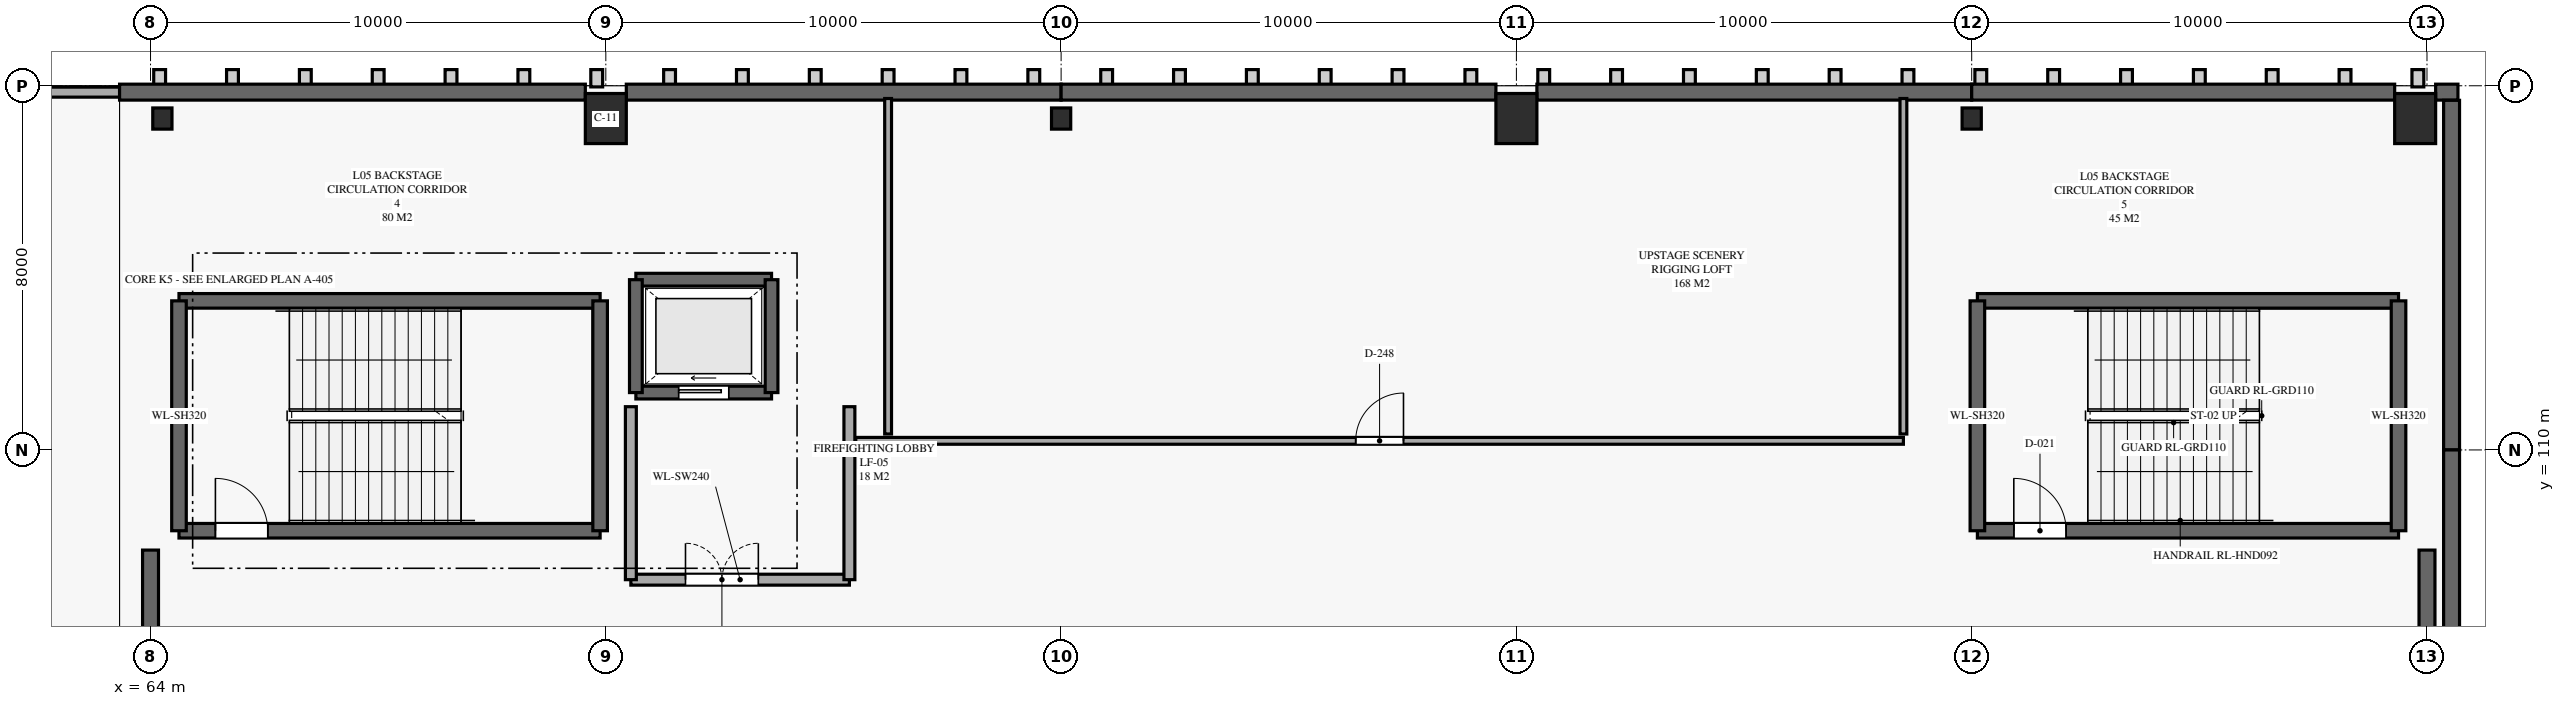
"""IFC4 building model, lengths in metres.
Left out: names, types, materials, properties, quantities, classifications, styles, units other than length and angle.
Written with IfcOpenShell. Run it as: python <this file> out.ifc"""

import sys

from ifc_helpers import new_model, si_unit, direction, frame, frame_2d, origin, origin_2d, place, context, subcontext, project, spatial, rectangle, i_section, extrude, element, fill, save


model = new_model("IFC4")
c1 = context("Model", 3, precision=1e-05, world=origin(), true_north=direction((0.0, 1.0)))
c2 = subcontext(c1, "Body", "Model", "MODEL_VIEW")
j1 = project(units=[si_unit("LENGTHUNIT", "METRE"), si_unit("PLANEANGLEUNIT", "RADIAN")], contexts=[c1])
p1 = place(None, origin())
s1 = spatial("IfcSite", under=j1, at=p1, CompositionType="ELEMENT")
p2 = place(p1, origin())
s2 = spatial("IfcBuilding", under=s1, at=p2, CompositionType="ELEMENT")
p3 = place(p2, frame((0.0, 0.0, 24.8)))
s3 = spatial("IfcBuildingStorey", under=s2, at=p3, CompositionType="ELEMENT", Elevation=24.8)
p4 = place(p3, frame((64.26, 117.28, 0.0), z_axis=(0.0, 0.0, 1.0), x_axis=(1.0, 0.0, 0.0)))
e1 = element("IfcColumn", 1, at=p4, inside=s3, PredefinedType="COLUMN", context=c2, shape_type="SweptSolid", body=[
    extrude(i_section(OverallWidth=0.422, OverallDepth=0.465, WebThickness=0.045, FlangeThickness=0.073, FilletRadius=0.02, at=origin_2d()), origin(), (0.0, 0.0, 1.0), 4.8),
])
p5 = place(p3, frame((74.0, 117.28, 0.0), z_axis=(0.0, 0.0, 1.0), x_axis=(1.0, 0.0, 0.0)))
e2 = element("IfcColumn", 2, at=p5, inside=s3, PredefinedType="COLUMN", context=c2, shape_type="SweptSolid", body=[
    extrude(rectangle(XDim=0.9, YDim=1.1, at=origin_2d()), origin(), (0.0, 0.0, 1.0), 4.8),
])
p6 = place(p3, frame((84.0, 117.28, 0.0), z_axis=(0.0, 0.0, 1.0), x_axis=(1.0, 0.0, 0.0)))
e3 = element("IfcColumn", 3, at=p6, inside=s3, PredefinedType="COLUMN", context=c2, shape_type="SweptSolid", body=[
    extrude(i_section(OverallWidth=0.422, OverallDepth=0.465, WebThickness=0.045, FlangeThickness=0.073, FilletRadius=0.02, at=origin_2d()), origin(), (0.0, 0.0, 1.0), 4.8),
])
p7 = place(p3, frame((94.0, 117.28, 0.0), z_axis=(0.0, 0.0, 1.0), x_axis=(1.0, 0.0, 0.0)))
e4 = element("IfcColumn", 4, at=p7, inside=s3, PredefinedType="COLUMN", context=c2, shape_type="SweptSolid", body=[
    extrude(rectangle(XDim=0.9, YDim=1.1, at=origin_2d()), origin(), (0.0, 0.0, 1.0), 4.8),
])
p8 = place(p3, frame((104.0, 117.28, 0.0), z_axis=(0.0, 0.0, 1.0), x_axis=(1.0, 0.0, 0.0)))
e5 = element("IfcColumn", 5, at=p8, inside=s3, PredefinedType="COLUMN", context=c2, shape_type="SweptSolid", body=[
    extrude(i_section(OverallWidth=0.422, OverallDepth=0.465, WebThickness=0.045, FlangeThickness=0.073, FilletRadius=0.02, at=origin_2d()), origin(), (0.0, 0.0, 1.0), 4.8),
])
p9 = place(p3, frame((113.74, 117.28, 0.0), z_axis=(0.0, 0.0, 1.0), x_axis=(1.0, 0.0, 0.0)))
e6 = element("IfcColumn", 6, at=p9, inside=s3, PredefinedType="COLUMN", context=c2, shape_type="SweptSolid", body=[
    extrude(rectangle(XDim=0.9, YDim=1.1, at=origin_2d()), origin(), (0.0, 0.0, 1.0), 4.8),
])
p10 = place(p3, frame((64.625, 108.225, 0.0), z_axis=(0.0, 0.0, 1.0), x_axis=(1.0, 0.0, 0.0)))
e7 = element("IfcWall", 7, at=p10, inside=s3, PredefinedType="SHEAR", context=c2, shape_type="SweptSolid", body=[
    extrude(rectangle(XDim=9.25, YDim=0.32, at=frame_2d((4.625, 0.0))), origin(), (0.0, 0.0, 1.0), 4.56),
])
p11 = place(p10, frame((0.8, 0.0, 0.0)))
e8 = element("IfcOpeningElement", 8, at=p11, cuts=e7, PredefinedType="OPENING", context=c2, shape_type="SweptSolid", body=[
    extrude(rectangle(XDim=1.15, YDim=2.2, at=frame_2d((0.575, 1.1))), frame((0.0, 0.17, 0.0), z_axis=(0.0, -1.0, 0.0), x_axis=(1.0, 0.0, 0.0)), (0.0, 0.0, 1.0), 0.34),
])
p12 = place(p3, frame((73.875, 113.275, 0.0), z_axis=(0.0, 0.0, 1.0), x_axis=(-1.0, 0.0, 0.0)))
e9 = element("IfcWall", 9, at=p12, inside=s3, PredefinedType="SHEAR", context=c2, shape_type="SweptSolid", body=[
    extrude(rectangle(XDim=9.25, YDim=0.32, at=frame_2d((4.625, 0.0))), origin(), (0.0, 0.0, 1.0), 4.56),
])
for number, where, z_axis, x_axis in (
    (10, (64.625, 113.275, 0.0), (0.0, 0.0, 1.0), (0.0, -1.0, 0.0)),
    (11, (73.875, 108.225, 0.0), (0.0, 0.0, 1.0), (0.0, 1.0, 0.0)),
):
    element("IfcWall", number, at=place(p3, frame(where, z_axis=z_axis, x_axis=x_axis)), inside=s3, PredefinedType="SHEAR", context=c2, shape_type="SweptSolid", body=[
        extrude(rectangle(XDim=5.05, YDim=0.32, at=frame_2d((2.525, 0.0))), origin(), (0.0, 0.0, 1.0), 4.56),
    ])
p13 = place(p3, frame((104.125, 108.225, 0.0), z_axis=(0.0, 0.0, 1.0), x_axis=(1.0, 0.0, 0.0)))
e12 = element("IfcWall", 12, at=p13, inside=s3, PredefinedType="SHEAR", context=c2, shape_type="SweptSolid", body=[
    extrude(rectangle(XDim=9.25, YDim=0.32, at=frame_2d((4.625, 0.0))), origin(), (0.0, 0.0, 1.0), 4.56),
])
p14 = place(p13, frame((0.8, 0.0, 0.0)))
e13 = element("IfcOpeningElement", 13, at=p14, cuts=e12, PredefinedType="OPENING", context=c2, shape_type="SweptSolid", body=[
    extrude(rectangle(XDim=1.15, YDim=2.2, at=frame_2d((0.575, 1.1))), frame((0.0, 0.17, 0.0), z_axis=(0.0, -1.0, 0.0), x_axis=(1.0, 0.0, 0.0)), (0.0, 0.0, 1.0), 0.34),
])
p15 = place(p3, frame((113.375, 113.275, 0.0), z_axis=(0.0, 0.0, 1.0), x_axis=(-1.0, 0.0, 0.0)))
e14 = element("IfcWall", 14, at=p15, inside=s3, PredefinedType="SHEAR", context=c2, shape_type="SweptSolid", body=[
    extrude(rectangle(XDim=9.25, YDim=0.32, at=frame_2d((4.625, 0.0))), origin(), (0.0, 0.0, 1.0), 4.56),
])
for number, where, z_axis, x_axis in (
    (15, (104.125, 113.275, 0.0), (0.0, 0.0, 1.0), (0.0, -1.0, 0.0)),
    (16, (113.375, 108.225, 0.0), (0.0, 0.0, 1.0), (0.0, 1.0, 0.0)),
):
    element("IfcWall", number, at=place(p3, frame(where, z_axis=z_axis, x_axis=x_axis)), inside=s3, PredefinedType="SHEAR", context=c2, shape_type="SweptSolid", body=[
        extrude(rectangle(XDim=5.05, YDim=0.32, at=frame_2d((2.525, 0.0))), origin(), (0.0, 0.0, 1.0), 4.56),
    ])
p16 = place(p3, frame((74.66, 111.26, 0.0), z_axis=(0.0, 0.0, 1.0), x_axis=(1.0, 0.0, 0.0)))
e17 = element("IfcWall", 17, at=p16, inside=s3, PredefinedType="SHEAR", context=c2, shape_type="SweptSolid", body=[
    extrude(rectangle(XDim=2.98, YDim=0.28, at=frame_2d((1.49, 0.0))), origin(), (0.0, 0.0, 1.0), 4.56),
])
p17 = place(p16, frame((0.94, 0.0, 0.0)))
e18 = element("IfcOpeningElement", 18, at=p17, cuts=e17, PredefinedType="OPENING", context=c2, shape_type="SweptSolid", body=[
    extrude(rectangle(XDim=1.1, YDim=2.2, at=frame_2d((0.55, 1.1))), frame((0.0, 0.15, 0.0), z_axis=(0.0, -1.0, 0.0), x_axis=(1.0, 0.0, 0.0)), (0.0, 0.0, 1.0), 0.3),
])
p18 = place(p3, frame((77.64, 113.74, 0.0), z_axis=(0.0, 0.0, 1.0), x_axis=(-1.0, 0.0, 0.0)))
e19 = element("IfcWall", 19, at=p18, inside=s3, PredefinedType="SHEAR", context=c2, shape_type="SweptSolid", body=[
    extrude(rectangle(XDim=2.98, YDim=0.28, at=frame_2d((1.49, 0.0))), origin(), (0.0, 0.0, 1.0), 4.56),
])
for number, where, z_axis, x_axis in (
    (20, (74.66, 113.74, 0.0), (0.0, 0.0, 1.0), (0.0, -1.0, 0.0)),
    (21, (77.64, 111.26, 0.0), (0.0, 0.0, 1.0), (0.0, 1.0, 0.0)),
):
    element("IfcWall", number, at=place(p3, frame(where, z_axis=z_axis, x_axis=x_axis)), inside=s3, PredefinedType="SHEAR", context=c2, shape_type="SweptSolid", body=[
        extrude(rectangle(XDim=2.48, YDim=0.28, at=frame_2d((1.24, 0.0))), origin(), (0.0, 0.0, 1.0), 4.56),
    ])
p19 = place(p3, frame((74.55, 107.15, 0.0), z_axis=(0.0, 0.0, 1.0), x_axis=(1.0, 0.0, 0.0)))
e22 = element("IfcWall", 22, at=p19, inside=s3, PredefinedType="SOLIDWALL", context=c2, shape_type="SweptSolid", body=[
    extrude(rectangle(XDim=4.8, YDim=0.24, at=frame_2d((2.4, 0.0))), origin(), (0.0, 0.0, 1.0), 3.432),
])
p20 = place(p19, frame((1.2, 0.0, 0.0)))
e23 = element("IfcOpeningElement", 23, at=p20, cuts=e22, PredefinedType="OPENING", context=c2, shape_type="SweptSolid", body=[
    extrude(rectangle(XDim=1.6, YDim=2.2, at=frame_2d((0.8, 1.1))), frame((0.0, 0.13, 0.0), z_axis=(0.0, -1.0, 0.0), x_axis=(1.0, 0.0, 0.0)), (0.0, 0.0, 1.0), 0.26),
])
for number, where, z_axis, x_axis in (
    (24, (74.55, 110.95, 0.0), (0.0, 0.0, 1.0), (0.0, -1.0, 0.0)),
    (25, (79.35, 107.15, 0.0), (0.0, 0.0, 1.0), (0.0, 1.0, 0.0)),
):
    element("IfcWall", number, at=place(p3, frame(where, z_axis=z_axis, x_axis=x_axis)), inside=s3, PredefinedType="SOLIDWALL", context=c2, shape_type="SweptSolid", body=[
        extrude(rectangle(XDim=3.8, YDim=0.24, at=frame_2d((1.9, 0.0))), origin(), (0.0, 0.0, 1.0), 4.56),
    ])
p21 = place(p3, frame((64.0, 102.232, 0.0), z_axis=(0.0, 0.0, 1.0), x_axis=(0.0, 1.0, 0.0)))
e26 = element("IfcWall", 26, at=p21, inside=s3, PredefinedType="SHEAR", context=c2, shape_type="SweptSolid", body=[
    extrude(rectangle(XDim=5.568, YDim=0.35, at=frame_2d((2.784, 0.0))), origin(), (0.0, 0.0, 1.0), 4.56),
])
p22 = place(p3, frame((114.0, 102.55, 0.0), z_axis=(0.0, 0.0, 1.0), x_axis=(0.0, 1.0, 0.0)))
e27 = element("IfcWall", 27, at=p22, inside=s3, PredefinedType="SHEAR", context=c2, shape_type="SweptSolid", body=[
    extrude(rectangle(XDim=5.25, YDim=0.35, at=frame_2d((2.625, 0.0))), origin(), (0.0, 0.0, 1.0), 4.56),
])
p23 = place(p3, frame((54.0, 117.86, 0.0), z_axis=(0.0, 0.0, 1.0), x_axis=(1.0, 0.0, 0.0)))
e28 = element("IfcWall", 28, at=p23, inside=s3, PredefinedType="SOLIDWALL", context=c2, shape_type="SweptSolid", body=[
    extrude(rectangle(XDim=9.32, YDim=0.22, at=frame_2d((4.66, 0.0))), origin(), (0.0, 0.0, 1.0), 4.53),
])
p24 = place(p23, frame((1.71, 0.0, 0.65)))
e29 = element("IfcOpeningElement", 29, at=p24, cuts=e28, PredefinedType="OPENING", context=c2, shape_type="SweptSolid", body=[
    extrude(rectangle(XDim=1.8, YDim=2.3, at=frame_2d((0.9, 1.15))), frame((0.0, 0.12, 0.0), z_axis=(0.0, -1.0, 0.0), x_axis=(1.0, 0.0, 0.0)), (0.0, 0.0, 1.0), 0.24),
])
p25 = place(p23, frame((4.91, 0.0, 0.65)))
e30 = element("IfcOpeningElement", 30, at=p25, cuts=e28, PredefinedType="OPENING", context=c2, shape_type="SweptSolid", body=[
    extrude(rectangle(XDim=1.6, YDim=2.3, at=frame_2d((0.8, 1.15))), frame((0.0, 0.12, 0.0), z_axis=(0.0, -1.0, 0.0), x_axis=(1.0, 0.0, 0.0)), (0.0, 0.0, 1.0), 0.24),
])
p26 = place(p3, frame((63.32, 117.86, 0.0), z_axis=(0.0, 0.0, 1.0), x_axis=(1.0, 0.0, 0.0)))
e31 = element("IfcWall", 31, at=p26, inside=s3, PredefinedType="SHEAR", context=c2, shape_type="SweptSolid", body=[
    extrude(rectangle(XDim=10.23, YDim=0.35, at=frame_2d((5.115, 0.0))), origin(), (0.0, 0.0, 1.0), 4.56),
])
for number, where, z_axis, x_axis in (
    (32, (74.45, 117.86, 0.0), (0.0, 0.0, 1.0), (1.0, 0.0, 0.0)),
    (33, (84.0, 117.86, 0.0), (0.0, 0.0, 1.0), (1.0, 0.0, 0.0)),
    (34, (94.45, 117.86, 0.0), (0.0, 0.0, 1.0), (1.0, 0.0, 0.0)),
):
    element("IfcWall", number, at=place(p3, frame(where, z_axis=z_axis, x_axis=x_axis)), inside=s3, PredefinedType="SHEAR", context=c2, shape_type="SweptSolid", body=[
        extrude(rectangle(XDim=9.55, YDim=0.35, at=frame_2d((4.775, 0.0))), origin(), (0.0, 0.0, 1.0), 4.56),
    ])
p27 = place(p3, frame((104.0, 117.86, 0.0), z_axis=(0.0, 0.0, 1.0), x_axis=(1.0, 0.0, 0.0)))
e35 = element("IfcWall", 35, at=p27, inside=s3, PredefinedType="SHEAR", context=c2, shape_type="SweptSolid", body=[
    extrude(rectangle(XDim=9.29, YDim=0.35, at=frame_2d((4.645, 0.0))), origin(), (0.0, 0.0, 1.0), 4.56),
])
p28 = place(p3, frame((114.19, 117.86, 0.0), z_axis=(0.0, 0.0, 1.0), x_axis=(1.0, 0.0, 0.0)))
e36 = element("IfcWall", 36, at=p28, inside=s3, PredefinedType="SHEAR", context=c2, shape_type="SweptSolid", body=[
    extrude(rectangle(XDim=0.49, YDim=0.35, at=frame_2d((0.245, 0.0))), origin(), (0.0, 0.0, 1.0), 4.56),
])
p29 = place(p3, frame((114.54, 117.68, 0.0), z_axis=(0.0, 0.0, 1.0), x_axis=(0.0, -1.0, 0.0)))
e37 = element("IfcWall", 37, at=p29, inside=s3, PredefinedType="SHEAR", context=c2, shape_type="SweptSolid", body=[
    extrude(rectangle(XDim=7.68, YDim=0.35, at=frame_2d((3.84, 0.0))), origin(), (0.0, 0.0, 1.0), 4.56),
])
p30 = place(p3, frame((114.54, 110.0, 0.0), z_axis=(0.0, 0.0, 1.0), x_axis=(0.0, -1.0, 0.0)))
e38 = element("IfcWall", 38, at=p30, inside=s3, PredefinedType="SHEAR", context=c2, shape_type="SweptSolid", body=[
    extrude(rectangle(XDim=8.0, YDim=0.35, at=frame_2d((4.0, 0.0))), origin(), (0.0, 0.0, 1.0), 4.56),
])
p31 = place(p3, frame((79.49, 110.2, 0.0), z_axis=(0.0, 0.0, 1.0), x_axis=(1.0, 0.0, 0.0)))
e39 = element("IfcWall", 39, at=p31, inside=s3, PredefinedType="PARTITIONING", context=c2, shape_type="SweptSolid", body=[
    extrude(rectangle(XDim=23.01, YDim=0.15, at=frame_2d((11.505, 0.0))), origin(), (0.0, 0.0, 1.0), 4.56),
])
p32 = place(p31, frame((10.98, 0.0, 0.0)))
e40 = element("IfcOpeningElement", 40, at=p32, cuts=e39, PredefinedType="OPENING", context=c2, shape_type="SweptSolid", body=[
    extrude(rectangle(XDim=1.05, YDim=2.2, at=frame_2d((0.525, 1.1))), frame((0.0, 0.085, 0.0), z_axis=(0.0, -1.0, 0.0), x_axis=(1.0, 0.0, 0.0)), (0.0, 0.0, 1.0), 0.17),
])
for number, where, z_axis, x_axis in (
    (41, (80.2, 117.72, 0.0), (0.0, 0.0, 1.0), (0.0, -1.0, 0.0)),
    (42, (102.5, 110.35, 0.0), (0.0, 0.0, 1.0), (0.0, 1.0, 0.0)),
):
    element("IfcWall", number, at=place(p3, frame(where, z_axis=z_axis, x_axis=x_axis)), inside=s3, PredefinedType="PARTITIONING", context=c2, shape_type="SweptSolid", body=[
        extrude(rectangle(XDim=7.37, YDim=0.15, at=frame_2d((3.685, 0.0))), origin(), (0.0, 0.0, 1.0), 4.56),
    ])
p33 = place(p11, origin())
e43 = element("IfcDoor", 43, at=p33, inside=s3, OperationType="SINGLE_SWING_LEFT", PredefinedType="DOOR", context=c2, shape_type="SweptSolid", body=[
    extrude(rectangle(XDim=1.15, YDim=2.2, at=frame_2d((0.575, 1.1))), frame((0.0, 0.025, 0.0), z_axis=(0.0, -1.0, 0.0), x_axis=(1.0, 0.0, 0.0)), (0.0, 0.0, 1.0), 0.05),
])
fill(e8, e43)
p34 = place(p14, origin())
e44 = element("IfcDoor", 44, at=p34, inside=s3, OperationType="SINGLE_SWING_LEFT", PredefinedType="DOOR", context=c2, shape_type="SweptSolid", body=[
    extrude(rectangle(XDim=1.15, YDim=2.2, at=frame_2d((0.575, 1.1))), frame((0.0, 0.025, 0.0), z_axis=(0.0, -1.0, 0.0), x_axis=(1.0, 0.0, 0.0)), (0.0, 0.0, 1.0), 0.05),
])
fill(e13, e44)
p35 = place(p17, origin())
e45 = element("IfcDoor", 45, at=p35, inside=s3, OperationType="SLIDING_TO_LEFT", PredefinedType="DOOR", context=c2, shape_type="SweptSolid", body=[
    extrude(rectangle(XDim=1.1, YDim=2.2, at=frame_2d((0.55, 1.1))), frame((0.0, 0.025, 0.0), z_axis=(0.0, -1.0, 0.0), x_axis=(1.0, 0.0, 0.0)), (0.0, 0.0, 1.0), 0.05),
])
fill(e18, e45)
p36 = place(p20, origin())
e46 = element("IfcDoor", 46, at=p36, inside=s3, OperationType="DOUBLE_DOOR_SINGLE_SWING", PredefinedType="DOOR", context=c2, shape_type="SweptSolid", body=[
    extrude(rectangle(XDim=1.6, YDim=2.2, at=frame_2d((0.8, 1.1))), frame((0.0, 0.025, 0.0), z_axis=(0.0, -1.0, 0.0), x_axis=(1.0, 0.0, 0.0)), (0.0, 0.0, 1.0), 0.05),
])
fill(e23, e46)
p37 = place(p32, origin())
e47 = element("IfcDoor", 47, at=p37, inside=s3, OperationType="SINGLE_SWING_RIGHT", PredefinedType="DOOR", context=c2, shape_type="SweptSolid", body=[
    extrude(rectangle(XDim=1.05, YDim=2.2, at=frame_2d((0.525, 1.1))), frame((0.0, 0.025, 0.0), z_axis=(0.0, -1.0, 0.0), x_axis=(1.0, 0.0, 0.0)), (0.0, 0.0, 1.0), 0.05),
])
fill(e40, e47)
save(model, sys.argv[1])
